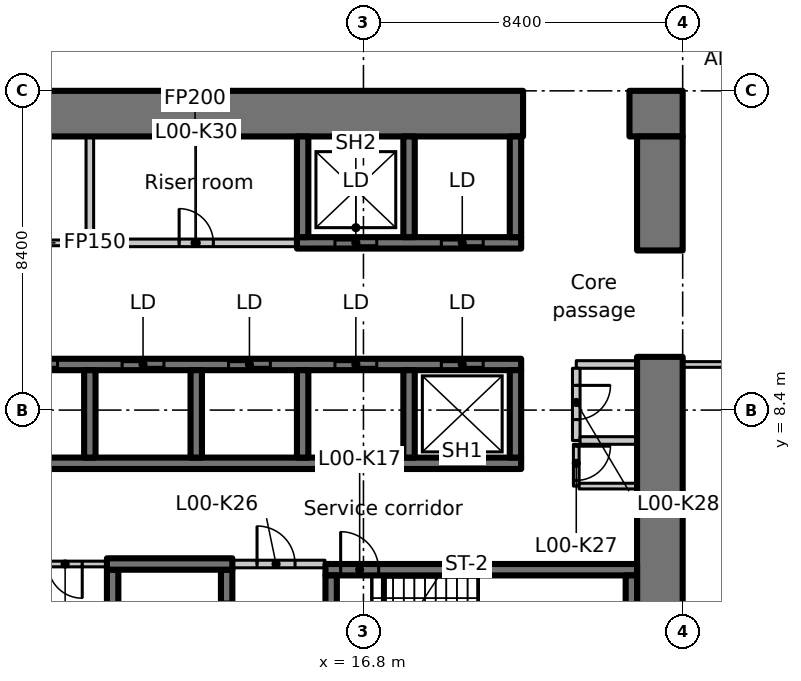
"""IFC4 building model, lengths in metres.
Left out: names, types, materials, properties, quantities, classifications, styles, units other than length and angle.
Written with IfcOpenShell. Run it as: python <this file> out.ifc"""

import sys

from ifc_helpers import new_model, si_unit, direction, frame, frame_2d, origin, place, context, subcontext, project, spatial, rectangle, extrude, element, fill, save


model = new_model("IFC4")
c1 = context("Model", 3, precision=1e-05, world=origin(), true_north=direction((0.0, 1.0)))
c2 = subcontext(c1, "Body", "Model", "MODEL_VIEW")
j1 = project(units=[si_unit("LENGTHUNIT", "METRE"), si_unit("PLANEANGLEUNIT", "RADIAN")], contexts=[c1])
p1 = place(None, origin())
s1 = spatial("IfcSite", under=j1, at=p1, CompositionType="ELEMENT")
p2 = place(p1, origin())
s2 = spatial("IfcBuilding", under=s1, at=p2, CompositionType="ELEMENT")
p3 = place(p2, origin())
s3 = spatial("IfcBuildingStorey", under=s2, at=p3, CompositionType="ELEMENT", Elevation=0.0)
p4 = place(p3, frame((-1.1, 16.2, 0.0), z_axis=(0.0, 0.0, 1.0), x_axis=(1.0, 0.0, 0.0)))
e1 = element("IfcWall", 1, at=p4, inside=s3, PredefinedType="SHEAR", context=c2, shape_type="SweptSolid", body=[
    extrude(rectangle(XDim=22.1, YDim=1.2, at=frame_2d((11.05, 0.0))), origin(), (0.0, 0.0, 1.0), 6.75),
])
p5 = place(p4, frame((3.15, 0.0, 0.0)))
e2 = element("IfcOpeningElement", 2, at=p5, cuts=e1, PredefinedType="OPENING", context=c2, shape_type="SweptSolid", body=[
    extrude(rectangle(XDim=1.1, YDim=2.3, at=frame_2d((0.55, 1.15))), frame((0.0, 0.61, 0.0), z_axis=(0.0, -1.0, 0.0), x_axis=(1.0, 0.0, 0.0)), (0.0, 0.0, 1.0), 1.22),
])
p6 = place(p3, frame((23.8, 16.2, 0.0), z_axis=(0.0, 0.0, 1.0), x_axis=(1.0, 0.0, 0.0)))
e3 = element("IfcWall", 3, at=p6, inside=s3, PredefinedType="SHEAR", context=c2, shape_type="SweptSolid", body=[
    extrude(rectangle(XDim=1.4, YDim=1.2, at=frame_2d((0.7, 0.0))), origin(), (0.0, 0.0, 1.0), 6.75),
])
p7 = place(p3, frame((24.6, 1.2, 0.0), z_axis=(0.0, 0.0, 1.0), x_axis=(0.0, 1.0, 0.0)))
e4 = element("IfcWall", 4, at=p7, inside=s3, PredefinedType="SHEAR", context=c2, shape_type="SweptSolid", body=[
    extrude(rectangle(XDim=8.6, YDim=1.2, at=frame_2d((4.3, 0.0))), origin(), (0.0, 0.0, 1.0), 6.75),
])
p8 = place(p3, frame((24.6, 12.6, 0.0), z_axis=(0.0, 0.0, 1.0), x_axis=(0.0, 1.0, 0.0)))
e5 = element("IfcWall", 5, at=p8, inside=s3, PredefinedType="SHEAR", context=c2, shape_type="SweptSolid", body=[
    extrude(rectangle(XDim=3.0, YDim=1.2, at=frame_2d((1.5, 0.0))), origin(), (0.0, 0.0, 1.0), 6.75),
])
p9 = place(p3, frame((1.2, 7.0, 0.0), z_axis=(0.0, 0.0, 1.0), x_axis=(1.0, 0.0, 0.0)))
e6 = element("IfcWall", 6, at=p9, inside=s3, PredefinedType="SHEAR", context=c2, shape_type="SweptSolid", body=[
    extrude(rectangle(XDim=19.75, YDim=0.3, at=frame_2d((9.875, 0.0))), origin(), (0.0, 0.0, 1.0), 6.75),
])
p10 = place(p3, frame((1.2, 9.6, 0.0), z_axis=(0.0, 0.0, 1.0), x_axis=(1.0, 0.0, 0.0)))
e7 = element("IfcWall", 7, at=p10, inside=s3, PredefinedType="SHEAR", context=c2, shape_type="SweptSolid", body=[
    extrude(rectangle(XDim=19.75, YDim=0.3, at=frame_2d((9.875, 0.0))), origin(), (0.0, 0.0, 1.0), 6.75),
])
p11 = place(p10, frame((0.85, 0.0, 0.0)))
e8 = element("IfcOpeningElement", 8, at=p11, cuts=e7, PredefinedType="OPENING", context=c2, shape_type="SweptSolid", body=[
    extrude(rectangle(XDim=1.1, YDim=2.3, at=frame_2d((0.55, 1.15))), frame((0.0, 0.16, 0.0), z_axis=(0.0, -1.0, 0.0), x_axis=(1.0, 0.0, 0.0)), (0.0, 0.0, 1.0), 0.32),
])
p12 = place(p10, frame((3.65, 0.0, 0.0)))
e9 = element("IfcOpeningElement", 9, at=p12, cuts=e7, PredefinedType="OPENING", context=c2, shape_type="SweptSolid", body=[
    extrude(rectangle(XDim=1.1, YDim=2.3, at=frame_2d((0.55, 1.15))), frame((0.0, 0.16, 0.0), z_axis=(0.0, -1.0, 0.0), x_axis=(1.0, 0.0, 0.0)), (0.0, 0.0, 1.0), 0.32),
])
p13 = place(p10, frame((6.45, 0.0, 0.0)))
e10 = element("IfcOpeningElement", 10, at=p13, cuts=e7, PredefinedType="OPENING", context=c2, shape_type="SweptSolid", body=[
    extrude(rectangle(XDim=1.1, YDim=2.3, at=frame_2d((0.55, 1.15))), frame((0.0, 0.16, 0.0), z_axis=(0.0, -1.0, 0.0), x_axis=(1.0, 0.0, 0.0)), (0.0, 0.0, 1.0), 0.32),
])
p14 = place(p10, frame((9.25, 0.0, 0.0)))
e11 = element("IfcOpeningElement", 11, at=p14, cuts=e7, PredefinedType="OPENING", context=c2, shape_type="SweptSolid", body=[
    extrude(rectangle(XDim=1.1, YDim=2.3, at=frame_2d((0.55, 1.15))), frame((0.0, 0.16, 0.0), z_axis=(0.0, -1.0, 0.0), x_axis=(1.0, 0.0, 0.0)), (0.0, 0.0, 1.0), 0.32),
])
p15 = place(p10, frame((12.05, 0.0, 0.0)))
e12 = element("IfcOpeningElement", 12, at=p15, cuts=e7, PredefinedType="OPENING", context=c2, shape_type="SweptSolid", body=[
    extrude(rectangle(XDim=1.1, YDim=2.3, at=frame_2d((0.55, 1.15))), frame((0.0, 0.16, 0.0), z_axis=(0.0, -1.0, 0.0), x_axis=(1.0, 0.0, 0.0)), (0.0, 0.0, 1.0), 0.32),
])
p16 = place(p10, frame((14.85, 0.0, 0.0)))
e13 = element("IfcOpeningElement", 13, at=p16, cuts=e7, PredefinedType="OPENING", context=c2, shape_type="SweptSolid", body=[
    extrude(rectangle(XDim=1.1, YDim=2.3, at=frame_2d((0.55, 1.15))), frame((0.0, 0.16, 0.0), z_axis=(0.0, -1.0, 0.0), x_axis=(1.0, 0.0, 0.0)), (0.0, 0.0, 1.0), 0.32),
])
p17 = place(p10, frame((17.65, 0.0, 0.0)))
e14 = element("IfcOpeningElement", 14, at=p17, cuts=e7, PredefinedType="OPENING", context=c2, shape_type="SweptSolid", body=[
    extrude(rectangle(XDim=1.1, YDim=2.3, at=frame_2d((0.55, 1.15))), frame((0.0, 0.16, 0.0), z_axis=(0.0, -1.0, 0.0), x_axis=(1.0, 0.0, 0.0)), (0.0, 0.0, 1.0), 0.32),
])
for number, where, z_axis, x_axis in (
    (15, (9.6, 7.15, 0.0), (0.0, 0.0, 1.0), (0.0, 1.0, 0.0)),
    (16, (12.4, 7.15, 0.0), (0.0, 0.0, 1.0), (0.0, 1.0, 0.0)),
    (17, (15.2, 7.15, 0.0), (0.0, 0.0, 1.0), (0.0, 1.0, 0.0)),
    (18, (18.0, 7.15, 0.0), (0.0, 0.0, 1.0), (0.0, 1.0, 0.0)),
    (19, (20.8, 7.15, 0.0), (0.0, 0.0, 1.0), (0.0, 1.0, 0.0)),
):
    element("IfcWall", number, at=place(p3, frame(where, z_axis=z_axis, x_axis=x_axis)), inside=s3, PredefinedType="SHEAR", context=c2, shape_type="SweptSolid", body=[
        extrude(rectangle(XDim=2.3, YDim=0.3, at=frame_2d((1.15, 0.0))), origin(), (0.0, 0.0, 1.0), 6.75),
    ])
p18 = place(p3, frame((15.05, 12.8, 0.0), z_axis=(0.0, 0.0, 1.0), x_axis=(1.0, 0.0, 0.0)))
e20 = element("IfcWall", 20, at=p18, inside=s3, PredefinedType="SHEAR", context=c2, shape_type="SweptSolid", body=[
    extrude(rectangle(XDim=5.9, YDim=0.3, at=frame_2d((2.95, 0.0))), origin(), (0.0, 0.0, 1.0), 6.75),
])
p19 = place(p18, frame((1.0, 0.0, 0.0)))
e21 = element("IfcOpeningElement", 21, at=p19, cuts=e20, PredefinedType="OPENING", context=c2, shape_type="SweptSolid", body=[
    extrude(rectangle(XDim=1.1, YDim=2.3, at=frame_2d((0.55, 1.15))), frame((0.0, 0.16, 0.0), z_axis=(0.0, -1.0, 0.0), x_axis=(1.0, 0.0, 0.0)), (0.0, 0.0, 1.0), 0.32),
])
p20 = place(p18, frame((3.8, 0.0, 0.0)))
e22 = element("IfcOpeningElement", 22, at=p20, cuts=e20, PredefinedType="OPENING", context=c2, shape_type="SweptSolid", body=[
    extrude(rectangle(XDim=1.1, YDim=2.3, at=frame_2d((0.55, 1.15))), frame((0.0, 0.16, 0.0), z_axis=(0.0, -1.0, 0.0), x_axis=(1.0, 0.0, 0.0)), (0.0, 0.0, 1.0), 0.32),
])
for number, where, z_axis, x_axis in (
    (23, (15.2, 12.95, 0.0), (0.0, 0.0, 1.0), (0.0, 1.0, 0.0)),
    (24, (18.0, 12.95, 0.0), (0.0, 0.0, 1.0), (0.0, 1.0, 0.0)),
    (25, (20.8, 12.95, 0.0), (0.0, 0.0, 1.0), (0.0, 1.0, 0.0)),
):
    element("IfcWall", number, at=place(p3, frame(where, z_axis=z_axis, x_axis=x_axis)), inside=s3, PredefinedType="SHEAR", context=c2, shape_type="SweptSolid", body=[
        extrude(rectangle(XDim=2.65, YDim=0.3, at=frame_2d((1.325, 0.0))), origin(), (0.0, 0.0, 1.0), 6.75),
    ])
p21 = place(p3, frame((10.2, 1.2, 0.0), z_axis=(0.0, 0.0, 1.0), x_axis=(0.0, 1.0, 0.0)))
e26 = element("IfcWall", 26, at=p21, inside=s3, PredefinedType="SHEAR", context=c2, shape_type="SweptSolid", body=[
    extrude(rectangle(XDim=3.0, YDim=0.3, at=frame_2d((1.5, 0.0))), origin(), (0.0, 0.0, 1.0), 6.75),
])
p22 = place(p3, frame((13.2, 1.2, 0.0), z_axis=(0.0, 0.0, 1.0), x_axis=(0.0, 1.0, 0.0)))
e27 = element("IfcWall", 27, at=p22, inside=s3, PredefinedType="SHEAR", context=c2, shape_type="SweptSolid", body=[
    extrude(rectangle(XDim=3.0, YDim=0.3, at=frame_2d((1.5, 0.0))), origin(), (0.0, 0.0, 1.0), 6.75),
])
p23 = place(p22, frame((1.05, 0.0, 0.0)))
e28 = element("IfcOpeningElement", 28, at=p23, cuts=e27, PredefinedType="OPENING", context=c2, shape_type="SweptSolid", body=[
    extrude(rectangle(XDim=1.1, YDim=2.3, at=frame_2d((0.55, 1.15))), frame((0.0, 0.16, 0.0), z_axis=(0.0, -1.0, 0.0), x_axis=(1.0, 0.0, 0.0)), (0.0, 0.0, 1.0), 0.32),
])
p24 = place(p3, frame((10.05, 4.35, 0.0), z_axis=(0.0, 0.0, 1.0), x_axis=(1.0, 0.0, 0.0)))
e29 = element("IfcWall", 29, at=p24, inside=s3, PredefinedType="SHEAR", context=c2, shape_type="SweptSolid", body=[
    extrude(rectangle(XDim=3.3, YDim=0.3, at=frame_2d((1.65, 0.0))), origin(), (0.0, 0.0, 1.0), 6.75),
])
p25 = place(p3, frame((15.8, 4.2, 0.0), z_axis=(0.0, 0.0, 1.0), x_axis=(1.0, 0.0, 0.0)))
e30 = element("IfcWall", 30, at=p25, inside=s3, PredefinedType="SHEAR", context=c2, shape_type="SweptSolid", body=[
    extrude(rectangle(XDim=8.2, YDim=0.3, at=frame_2d((4.1, 0.0))), origin(), (0.0, 0.0, 1.0), 6.75),
])
p26 = place(p25, frame((0.4, 0.0, 0.0)))
e31 = element("IfcOpeningElement", 31, at=p26, cuts=e30, PredefinedType="OPENING", context=c2, shape_type="SweptSolid", body=[
    extrude(rectangle(XDim=1.0, YDim=2.1, at=frame_2d((0.5, 1.05))), frame((0.0, 0.16, 0.0), z_axis=(0.0, -1.0, 0.0), x_axis=(1.0, 0.0, 0.0)), (0.0, 0.0, 1.0), 0.32),
])
p27 = place(p3, frame((15.95, 1.5, 0.0), z_axis=(0.0, 0.0, 1.0), x_axis=(0.0, 1.0, 0.0)))
e32 = element("IfcWall", 32, at=p27, inside=s3, PredefinedType="SHEAR", context=c2, shape_type="SweptSolid", body=[
    extrude(rectangle(XDim=2.55, YDim=0.3, at=frame_2d((1.275, 0.0))), origin(), (0.0, 0.0, 1.0), 6.75),
])
p28 = place(p27, frame((0.8, 0.0, 0.0)))
e33 = element("IfcOpeningElement", 33, at=p28, cuts=e32, PredefinedType="OPENING", context=c2, shape_type="SweptSolid", body=[
    extrude(rectangle(XDim=1.0, YDim=2.1, at=frame_2d((0.5, 1.05))), frame((0.0, 0.16, 0.0), z_axis=(0.0, -1.0, 0.0), x_axis=(1.0, 0.0, 0.0)), (0.0, 0.0, 1.0), 0.32),
])
p29 = place(p3, frame((23.85, 1.5, 0.0), z_axis=(0.0, 0.0, 1.0), x_axis=(0.0, 1.0, 0.0)))
e34 = element("IfcWall", 34, at=p29, inside=s3, PredefinedType="SHEAR", context=c2, shape_type="SweptSolid", body=[
    extrude(rectangle(XDim=2.55, YDim=0.3, at=frame_2d((1.275, 0.0))), origin(), (0.0, 0.0, 1.0), 6.75),
])
p30 = place(p3, frame((13.362, 4.35, 0.0), z_axis=(0.0, 0.0, 1.0), x_axis=(1.0, 0.0, 0.0)))
e35 = element("IfcWall", 35, at=p30, inside=s3, PredefinedType="PARTITIONING", context=c2, shape_type="SweptSolid", body=[
    extrude(rectangle(XDim=2.426, YDim=0.2, at=frame_2d((1.213, 0.0))), origin(), (0.0, 0.0, 1.0), 6.75),
])
p31 = place(p30, frame((0.638, 0.0, 0.0)))
e36 = element("IfcOpeningElement", 36, at=p31, cuts=e35, PredefinedType="OPENING", context=c2, shape_type="SweptSolid", body=[
    extrude(rectangle(XDim=1.0, YDim=2.1, at=frame_2d((0.5, 1.05))), frame((0.0, 0.11, 0.0), z_axis=(0.0, -1.0, 0.0), x_axis=(1.0, 0.0, 0.0)), (0.0, 0.0, 1.0), 0.22),
])
p32 = place(p3, frame((9.6, 15.588, 0.0), z_axis=(0.0, 0.0, 1.0), x_axis=(0.0, -1.0, 0.0)))
e37 = element("IfcWall", 37, at=p32, inside=s3, PredefinedType="PARTITIONING", context=c2, shape_type="SweptSolid", body=[
    extrude(rectangle(XDim=2.788, YDim=0.2, at=frame_2d((1.394, 0.0))), origin(), (0.0, 0.0, 1.0), 6.75),
])
p33 = place(p3, frame((9.7, 12.8, 0.0), z_axis=(0.0, 0.0, 1.0), x_axis=(1.0, 0.0, 0.0)))
e38 = element("IfcWall", 38, at=p33, inside=s3, PredefinedType="PARTITIONING", context=c2, shape_type="SweptSolid", body=[
    extrude(rectangle(XDim=5.338, YDim=0.2, at=frame_2d((2.669, 0.0))), origin(), (0.0, 0.0, 1.0), 6.75),
])
p34 = place(p33, frame((2.25, 0.0, 0.0)))
e39 = element("IfcOpeningElement", 39, at=p34, cuts=e38, PredefinedType="OPENING", context=c2, shape_type="SweptSolid", body=[
    extrude(rectangle(XDim=0.9, YDim=2.1, at=frame_2d((0.45, 1.05))), frame((0.0, 0.11, 0.0), z_axis=(0.0, -1.0, 0.0), x_axis=(1.0, 0.0, 0.0)), (0.0, 0.0, 1.0), 0.22),
])
p35 = place(p3, frame((23.988, 9.6, 0.0), z_axis=(0.0, 0.0, 1.0), x_axis=(-1.0, 0.0, 0.0)))
e40 = element("IfcWall", 40, at=p35, inside=s3, PredefinedType="PARTITIONING", context=c2, shape_type="SweptSolid", body=[
    extrude(rectangle(XDim=1.588, YDim=0.2, at=frame_2d((0.794, 0.0))), origin(), (0.0, 0.0, 1.0), 6.75),
])
p36 = place(p3, frame((22.4, 9.5, 0.0), z_axis=(0.0, 0.0, 1.0), x_axis=(0.0, -1.0, 0.0)))
e41 = element("IfcWall", 41, at=p36, inside=s3, PredefinedType="PARTITIONING", context=c2, shape_type="SweptSolid", body=[
    extrude(rectangle(XDim=1.9, YDim=0.2, at=frame_2d((0.95, 0.0))), origin(), (0.0, 0.0, 1.0), 6.75),
])
p37 = place(p36, frame((0.45, 0.0, 0.0)))
e42 = element("IfcOpeningElement", 42, at=p37, cuts=e41, PredefinedType="OPENING", context=c2, shape_type="SweptSolid", body=[
    extrude(rectangle(XDim=0.9, YDim=2.1, at=frame_2d((0.45, 1.05))), frame((0.0, 0.11, 0.0), z_axis=(0.0, -1.0, 0.0), x_axis=(1.0, 0.0, 0.0)), (0.0, 0.0, 1.0), 0.22),
])
p38 = place(p3, frame((22.5, 7.6, 0.0), z_axis=(0.0, 0.0, 1.0), x_axis=(1.0, 0.0, 0.0)))
e43 = element("IfcWall", 43, at=p38, inside=s3, PredefinedType="PARTITIONING", context=c2, shape_type="SweptSolid", body=[
    extrude(rectangle(XDim=1.488, YDim=0.2, at=frame_2d((0.744, 0.0))), origin(), (0.0, 0.0, 1.0), 6.75),
])
p39 = place(p3, frame((4.162, 12.8, 0.0), z_axis=(0.0, 0.0, 1.0), x_axis=(1.0, 0.0, 0.0)))
e44 = element("IfcWall", 44, at=p39, inside=s3, PredefinedType="PARTITIONING", context=c2, shape_type="SweptSolid", body=[
    extrude(rectangle(XDim=5.338, YDim=0.15, at=frame_2d((2.669, 0.0))), origin(), (0.0, 0.0, 1.0), 6.75),
])
p40 = place(p39, frame((2.188, 0.0, 0.0)))
e45 = element("IfcOpeningElement", 45, at=p40, cuts=e44, PredefinedType="OPENING", context=c2, shape_type="SweptSolid", body=[
    extrude(rectangle(XDim=0.9, YDim=2.1, at=frame_2d((0.45, 1.05))), frame((0.0, 0.085, 0.0), z_axis=(0.0, -1.0, 0.0), x_axis=(1.0, 0.0, 0.0)), (0.0, 0.0, 1.0), 0.17),
])
p41 = place(p3, frame((10.038, 4.35, 0.0), z_axis=(0.0, 0.0, 1.0), x_axis=(-1.0, 0.0, 0.0)))
e46 = element("IfcWall", 46, at=p41, inside=s3, PredefinedType="PARTITIONING", context=c2, shape_type="SweptSolid", body=[
    extrude(rectangle(XDim=2.263, YDim=0.15, at=frame_2d((1.132, 0.0))), origin(), (0.0, 0.0, 1.0), 6.75),
])
p42 = place(p41, frame((0.638, 0.0, 0.0)))
e47 = element("IfcOpeningElement", 47, at=p42, cuts=e46, PredefinedType="OPENING", context=c2, shape_type="SweptSolid", body=[
    extrude(rectangle(XDim=0.9, YDim=2.1, at=frame_2d((0.45, 1.05))), frame((0.0, 0.085, 0.0), z_axis=(0.0, -1.0, 0.0), x_axis=(1.0, 0.0, 0.0)), (0.0, 0.0, 1.0), 0.17),
])
p43 = place(p3, frame((22.4, 7.5, 0.0), z_axis=(0.0, 0.0, 1.0), x_axis=(0.0, -1.0, 0.0)))
e48 = element("IfcWall", 48, at=p43, inside=s3, PredefinedType="PARTITIONING", context=c2, shape_type="SweptSolid", body=[
    extrude(rectangle(XDim=1.1, YDim=0.15, at=frame_2d((0.55, 0.0))), origin(), (0.0, 0.0, 1.0), 6.75),
])
p44 = place(p43, frame((0.05, 0.0, 0.0)))
e49 = element("IfcOpeningElement", 49, at=p44, cuts=e48, PredefinedType="OPENING", context=c2, shape_type="SweptSolid", body=[
    extrude(rectangle(XDim=0.9, YDim=2.1, at=frame_2d((0.45, 1.05))), frame((0.0, 0.085, 0.0), z_axis=(0.0, -1.0, 0.0), x_axis=(1.0, 0.0, 0.0)), (0.0, 0.0, 1.0), 0.17),
])
p45 = place(p3, frame((22.475, 6.4, 0.0), z_axis=(0.0, 0.0, 1.0), x_axis=(1.0, 0.0, 0.0)))
e50 = element("IfcWall", 50, at=p45, inside=s3, PredefinedType="PARTITIONING", context=c2, shape_type="SweptSolid", body=[
    extrude(rectangle(XDim=1.513, YDim=0.15, at=frame_2d((0.756, 0.0))), origin(), (0.0, 0.0, 1.0), 6.75),
])
p46 = place(p3, frame((29.4, 9.6, 0.0), z_axis=(0.0, 0.0, 1.0), x_axis=(-1.0, 0.0, 0.0)))
e51 = element("IfcWall", 51, at=p46, inside=s3, PredefinedType="PARTITIONING", context=c2, shape_type="SweptSolid", body=[
    extrude(rectangle(XDim=4.2, YDim=0.15, at=frame_2d((2.1, 0.0))), origin(), (0.0, 0.0, 1.0), 6.73),
])
p47 = place(p46, frame((1.5, 0.0, 0.0)))
e52 = element("IfcOpeningElement", 52, at=p47, cuts=e51, PredefinedType="OPENING", context=c2, shape_type="SweptSolid", body=[
    extrude(rectangle(XDim=1.1, YDim=2.1, at=frame_2d((0.55, 1.05))), frame((0.0, 0.085, 0.0), z_axis=(0.0, -1.0, 0.0), x_axis=(1.0, 0.0, 0.0)), (0.0, 0.0, 1.0), 0.17),
])
p48 = place(p13, origin())
e53 = element("IfcDoor", 53, at=p48, inside=s3, OperationType="SLIDING_TO_LEFT", PredefinedType="DOOR", context=c2, shape_type="SweptSolid", body=[
    extrude(rectangle(XDim=1.1, YDim=2.3, at=frame_2d((0.55, 1.15))), frame((0.0, 0.025, 0.0), z_axis=(0.0, -1.0, 0.0), x_axis=(1.0, 0.0, 0.0)), (0.0, 0.0, 1.0), 0.05),
])
fill(e10, e53)
p49 = place(p14, origin())
e54 = element("IfcDoor", 54, at=p49, inside=s3, OperationType="SLIDING_TO_LEFT", PredefinedType="DOOR", context=c2, shape_type="SweptSolid", body=[
    extrude(rectangle(XDim=1.1, YDim=2.3, at=frame_2d((0.55, 1.15))), frame((0.0, 0.025, 0.0), z_axis=(0.0, -1.0, 0.0), x_axis=(1.0, 0.0, 0.0)), (0.0, 0.0, 1.0), 0.05),
])
fill(e11, e54)
p50 = place(p15, origin())
e55 = element("IfcDoor", 55, at=p50, inside=s3, OperationType="SLIDING_TO_LEFT", PredefinedType="DOOR", context=c2, shape_type="SweptSolid", body=[
    extrude(rectangle(XDim=1.1, YDim=2.3, at=frame_2d((0.55, 1.15))), frame((0.0, 0.025, 0.0), z_axis=(0.0, -1.0, 0.0), x_axis=(1.0, 0.0, 0.0)), (0.0, 0.0, 1.0), 0.05),
])
fill(e12, e55)
p51 = place(p16, origin())
e56 = element("IfcDoor", 56, at=p51, inside=s3, OperationType="SLIDING_TO_LEFT", PredefinedType="DOOR", context=c2, shape_type="SweptSolid", body=[
    extrude(rectangle(XDim=1.1, YDim=2.3, at=frame_2d((0.55, 1.15))), frame((0.0, 0.025, 0.0), z_axis=(0.0, -1.0, 0.0), x_axis=(1.0, 0.0, 0.0)), (0.0, 0.0, 1.0), 0.05),
])
fill(e13, e56)
p52 = place(p17, origin())
e57 = element("IfcDoor", 57, at=p52, inside=s3, OperationType="SLIDING_TO_LEFT", PredefinedType="DOOR", context=c2, shape_type="SweptSolid", body=[
    extrude(rectangle(XDim=1.1, YDim=2.3, at=frame_2d((0.55, 1.15))), frame((0.0, 0.025, 0.0), z_axis=(0.0, -1.0, 0.0), x_axis=(1.0, 0.0, 0.0)), (0.0, 0.0, 1.0), 0.05),
])
fill(e14, e57)
p53 = place(p19, origin())
e58 = element("IfcDoor", 58, at=p53, inside=s3, OperationType="SLIDING_TO_LEFT", PredefinedType="DOOR", context=c2, shape_type="SweptSolid", body=[
    extrude(rectangle(XDim=1.1, YDim=2.3, at=frame_2d((0.55, 1.15))), frame((0.0, 0.025, 0.0), z_axis=(0.0, -1.0, 0.0), x_axis=(1.0, 0.0, 0.0)), (0.0, 0.0, 1.0), 0.05),
])
fill(e21, e58)
p54 = place(p20, origin())
e59 = element("IfcDoor", 59, at=p54, inside=s3, OperationType="SLIDING_TO_LEFT", PredefinedType="DOOR", context=c2, shape_type="SweptSolid", body=[
    extrude(rectangle(XDim=1.1, YDim=2.3, at=frame_2d((0.55, 1.15))), frame((0.0, 0.025, 0.0), z_axis=(0.0, -1.0, 0.0), x_axis=(1.0, 0.0, 0.0)), (0.0, 0.0, 1.0), 0.05),
])
fill(e22, e59)
p55 = place(p26, origin())
e60 = element("IfcDoor", 60, at=p55, inside=s3, OperationType="SINGLE_SWING_RIGHT", PredefinedType="DOOR", context=c2, shape_type="SweptSolid", body=[
    extrude(rectangle(XDim=1.0, YDim=2.1, at=frame_2d((0.5, 1.05))), frame((0.0, 0.025, 0.0), z_axis=(0.0, -1.0, 0.0), x_axis=(1.0, 0.0, 0.0)), (0.0, 0.0, 1.0), 0.05),
])
fill(e31, e60)
p56 = place(p42, origin())
e61 = element("IfcDoor", 61, at=p56, inside=s3, OperationType="SINGLE_SWING_RIGHT", PredefinedType="DOOR", context=c2, shape_type="SweptSolid", body=[
    extrude(rectangle(XDim=0.9, YDim=2.1, at=frame_2d((0.45, 1.05))), frame((0.0, 0.025, 0.0), z_axis=(0.0, -1.0, 0.0), x_axis=(1.0, 0.0, 0.0)), (0.0, 0.0, 1.0), 0.05),
])
fill(e47, e61)
p57 = place(p31, origin())
e62 = element("IfcDoor", 62, at=p57, inside=s3, OperationType="SINGLE_SWING_LEFT", PredefinedType="DOOR", context=c2, shape_type="SweptSolid", body=[
    extrude(rectangle(XDim=1.0, YDim=2.1, at=frame_2d((0.5, 1.05))), frame((0.0, 0.025, 0.0), z_axis=(0.0, -1.0, 0.0), x_axis=(1.0, 0.0, 0.0)), (0.0, 0.0, 1.0), 0.05),
])
fill(e36, e62)
p58 = place(p44, origin())
e63 = element("IfcDoor", 63, at=p58, inside=s3, OperationType="SINGLE_SWING_RIGHT", PredefinedType="DOOR", context=c2, shape_type="SweptSolid", body=[
    extrude(rectangle(XDim=0.9, YDim=2.1, at=frame_2d((0.45, 1.05))), frame((0.0, 0.025, 0.0), z_axis=(0.0, -1.0, 0.0), x_axis=(1.0, 0.0, 0.0)), (0.0, 0.0, 1.0), 0.05),
])
fill(e49, e63)
p59 = place(p37, origin())
e64 = element("IfcDoor", 64, at=p59, inside=s3, OperationType="SINGLE_SWING_LEFT", PredefinedType="DOOR", context=c2, shape_type="SweptSolid", body=[
    extrude(rectangle(XDim=0.9, YDim=2.1, at=frame_2d((0.45, 1.05))), frame((0.0, 0.025, 0.0), z_axis=(0.0, -1.0, 0.0), x_axis=(1.0, 0.0, 0.0)), (0.0, 0.0, 1.0), 0.05),
])
fill(e42, e64)
p60 = place(p34, origin())
e65 = element("IfcDoor", 65, at=p60, inside=s3, OperationType="SINGLE_SWING_LEFT", PredefinedType="DOOR", context=c2, shape_type="SweptSolid", body=[
    extrude(rectangle(XDim=0.9, YDim=2.1, at=frame_2d((0.45, 1.05))), frame((0.0, 0.025, 0.0), z_axis=(0.0, -1.0, 0.0), x_axis=(1.0, 0.0, 0.0)), (0.0, 0.0, 1.0), 0.05),
])
fill(e39, e65)
save(model, sys.argv[1])
